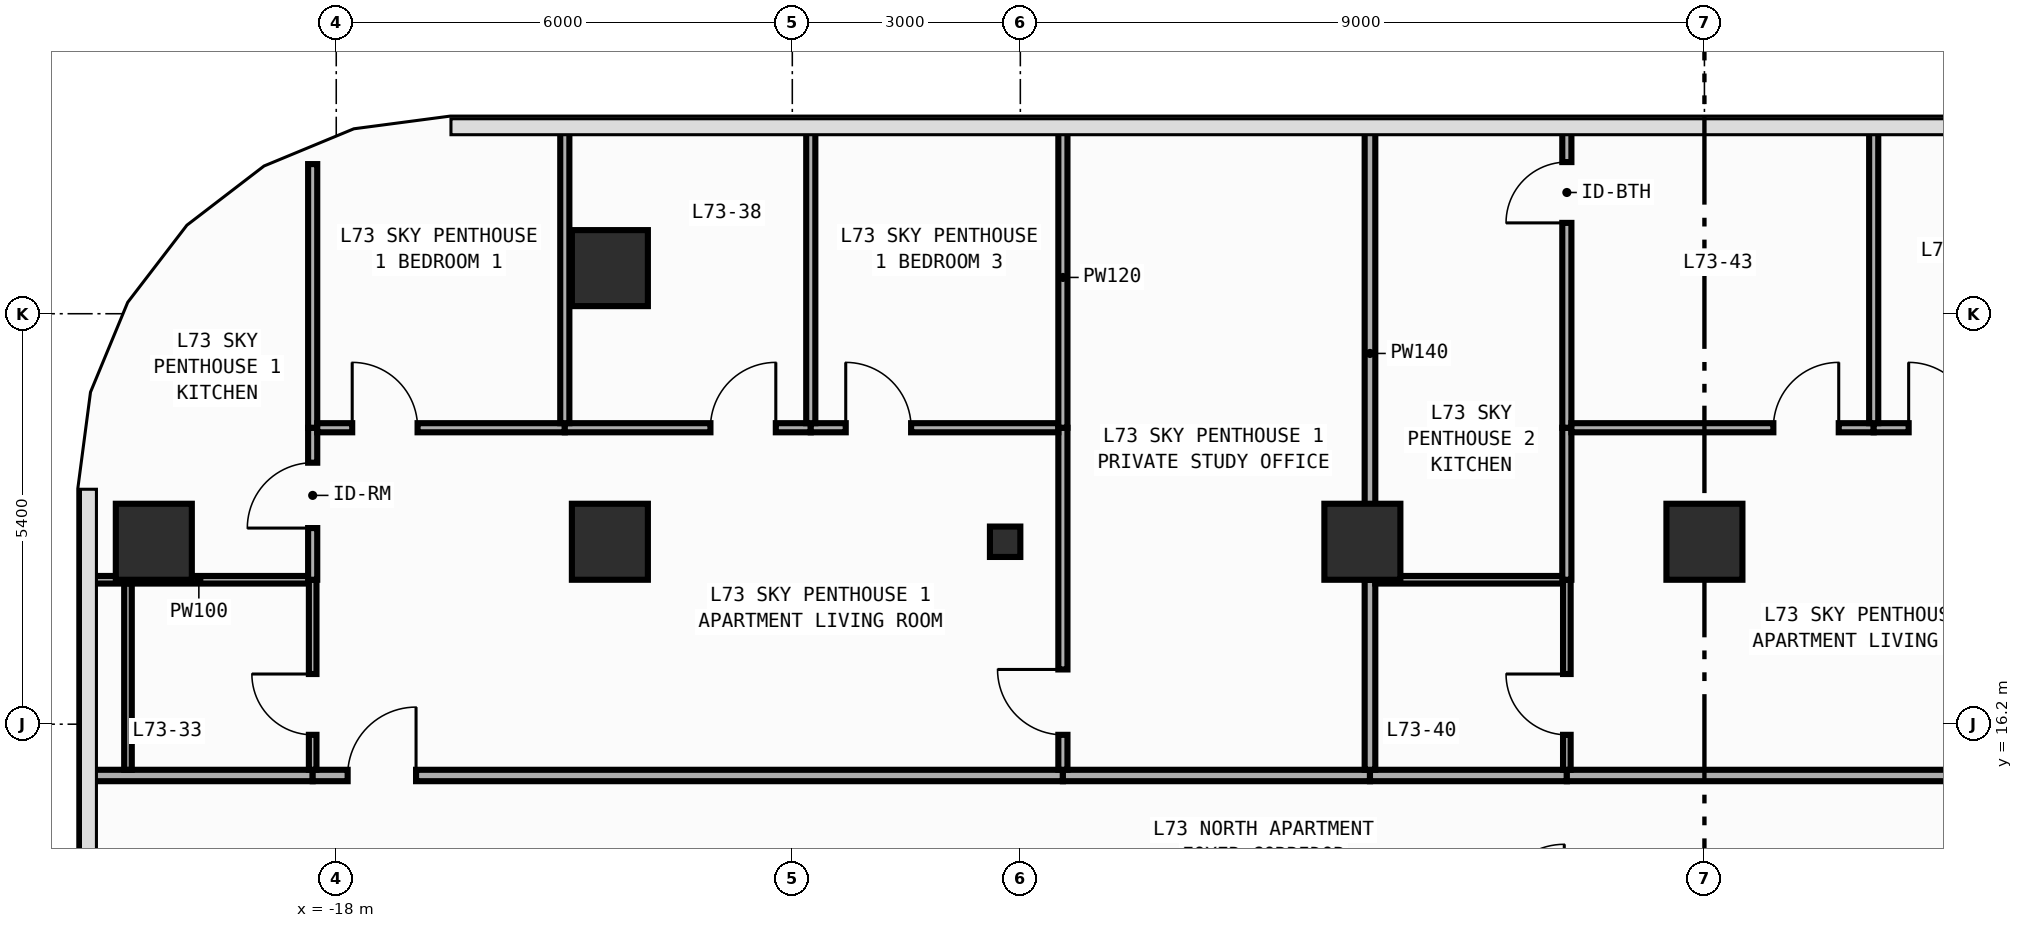
"""IFC4 building model, lengths in metres.
Left out: names, types, materials, properties, quantities, classifications, styles, units other than length and angle.
Written with IfcOpenShell. Run it as: python <this file> out.ifc"""

import sys

from ifc_helpers import new_model, si_unit, direction, frame, frame_2d, origin, origin_2d, place, context, subcontext, project, spatial, rectangle, circle, i_section, extrude, element, fill, save


model = new_model("IFC4")
c1 = context("Model", 3, precision=1e-05, world=origin(), true_north=direction((0.0, 1.0)))
c2 = subcontext(c1, "Body", "Model", "MODEL_VIEW")
j1 = project(units=[si_unit("LENGTHUNIT", "METRE"), si_unit("PLANEANGLEUNIT", "RADIAN")], contexts=[c1])
p1 = place(None, origin())
s1 = spatial("IfcSite", under=j1, at=p1, CompositionType="ELEMENT")
p2 = place(p1, origin())
s2 = spatial("IfcBuilding", under=s1, at=p2, CompositionType="ELEMENT")
p3 = place(p2, frame((0.0, 0.0, 304.2)))
s3 = spatial("IfcBuildingStorey", under=s2, at=p3, CompositionType="ELEMENT", Elevation=304.2)
p4 = place(p3, frame((-9.2, 18.6, 0.0), z_axis=(0.0, 0.0, 1.0), x_axis=(1.0, 0.0, 0.0)))
e1 = element("IfcColumn", 1, at=p4, inside=s3, PredefinedType="COLUMN", context=c2, shape_type="SweptSolid", body=[
    extrude(i_section(OverallWidth=0.4, OverallDepth=0.4, WebThickness=0.013, FlangeThickness=0.021, FilletRadius=0.022, at=origin_2d()), origin(), (0.0, 0.0, 1.0), 3.8),
])
for number, where, z_axis, x_axis in (
    (2, (-20.4, 18.6, 0.0), (0.0, 0.0, 1.0), (1.0, 0.0, 0.0)),
    (3, (-14.4, 18.6, 0.0), (0.0, 0.0, 1.0), (1.0, 0.0, 0.0)),
    (4, (-4.5, 18.6, 0.0), (0.0, 0.0, 1.0), (1.0, 0.0, 0.0)),
    (5, (0.0, 18.6, 0.0), (0.0, 0.0, 1.0), (1.0, 0.0, 0.0)),
    (6, (-14.4, 22.2, 0.0), (0.0, 0.0, 1.0), (1.0, 0.0, 0.0)),
):
    element("IfcColumn", number, at=place(p3, frame(where, z_axis=z_axis, x_axis=x_axis)), inside=s3, PredefinedType="COLUMN", context=c2, shape_type="SweptSolid", body=[
        extrude(circle(Radius=0.5, at=origin_2d()), origin(), (0.0, 0.0, 1.0), 3.8),
    ])
p5 = place(p3, frame((-21.255, 15.525, 0.0), z_axis=(0.0, 0.0, 1.0), x_axis=(1.0, 0.0, 0.0)))
e7 = element("IfcWall", 7, at=p5, inside=s3, PredefinedType="PARTITIONING", context=c2, shape_type="SweptSolid", body=[
    extrude(rectangle(XDim=2.945, YDim=0.15, at=frame_2d((1.472, 0.0))), origin(), (0.0, 0.0, 1.0), 3.54),
])
p6 = place(p3, frame((-18.31, 15.525, 0.0), z_axis=(0.0, 0.0, 1.0), x_axis=(1.0, 0.0, 0.0)))
e8 = element("IfcWall", 8, at=p6, inside=s3, PredefinedType="PARTITIONING", context=c2, shape_type="SweptSolid", body=[
    extrude(rectangle(XDim=9.87, YDim=0.15, at=frame_2d((4.935, 0.0))), origin(), (0.0, 0.0, 1.0), 3.54),
])
p7 = place(p6, frame((0.46, 0.0, 0.0)))
e9 = element("IfcOpeningElement", 9, at=p7, cuts=e8, PredefinedType="OPENING", context=c2, shape_type="SweptSolid", body=[
    extrude(rectangle(XDim=0.9, YDim=2.15, at=frame_2d((0.45, 1.075))), frame((0.0, 0.085, 0.0), z_axis=(0.0, -1.0, 0.0), x_axis=(1.0, 0.0, 0.0)), (0.0, 0.0, 1.0), 0.17),
])
p8 = place(p3, frame((-8.44, 15.525, 0.0), z_axis=(0.0, 0.0, 1.0), x_axis=(1.0, 0.0, 0.0)))
e10 = element("IfcWall", 10, at=p8, inside=s3, PredefinedType="PARTITIONING", context=c2, shape_type="SweptSolid", body=[
    extrude(rectangle(XDim=4.04, YDim=0.15, at=frame_2d((2.02, 0.0))), origin(), (0.0, 0.0, 1.0), 3.54),
])
p9 = place(p3, frame((-4.4, 15.525, 0.0), z_axis=(0.0, 0.0, 1.0), x_axis=(1.0, 0.0, 0.0)))
e11 = element("IfcWall", 11, at=p9, inside=s3, PredefinedType="PARTITIONING", context=c2, shape_type="SweptSolid", body=[
    extrude(rectangle(XDim=2.59, YDim=0.15, at=frame_2d((1.295, 0.0))), origin(), (0.0, 0.0, 1.0), 3.54),
])
p10 = place(p3, frame((-1.81, 15.525, 0.0), z_axis=(0.0, 0.0, 1.0), x_axis=(1.0, 0.0, 0.0)))
e12 = element("IfcWall", 12, at=p10, inside=s3, PredefinedType="PARTITIONING", context=c2, shape_type="SweptSolid", body=[
    extrude(rectangle(XDim=11.25, YDim=0.15, at=frame_2d((5.625, 0.0))), origin(), (0.0, 0.0, 1.0), 3.54),
])
p11 = place(p10, frame((8.486, 0.0, 0.0)))
e13 = element("IfcOpeningElement", 13, at=p11, cuts=e12, PredefinedType="OPENING", context=c2, shape_type="SweptSolid", body=[
    extrude(rectangle(XDim=0.9, YDim=2.15, at=frame_2d((0.45, 1.075))), frame((0.0, 0.085, 0.0), z_axis=(0.0, -1.0, 0.0), x_axis=(1.0, 0.0, 0.0)), (0.0, 0.0, 1.0), 0.17),
])
p12 = place(p3, frame((-21.255, 18.1, 0.0), z_axis=(0.0, 0.0, 1.0), x_axis=(1.0, 0.0, 0.0)))
e14 = element("IfcWall", 14, at=p12, inside=s3, PredefinedType="PARTITIONING", context=c2, shape_type="SweptSolid", body=[
    extrude(rectangle(XDim=2.895, YDim=0.1, at=frame_2d((1.447, 0.0))), origin(), (0.0, 0.0, 1.0), 3.54),
])
p13 = place(p3, frame((-18.31, 15.6, 0.0), z_axis=(0.0, 0.0, 1.0), x_axis=(0.0, 1.0, 0.0)))
e15 = element("IfcWall", 15, at=p13, inside=s3, PredefinedType="PARTITIONING", context=c2, shape_type="SweptSolid", body=[
    extrude(rectangle(XDim=2.5, YDim=0.1, at=frame_2d((1.25, 0.0))), origin(), (0.0, 0.0, 1.0), 3.54),
])
p14 = place(p13, frame((0.46, 0.0, 0.0)))
e16 = element("IfcOpeningElement", 16, at=p14, cuts=e15, PredefinedType="OPENING", context=c2, shape_type="SweptSolid", body=[
    extrude(rectangle(XDim=0.8, YDim=2.1, at=frame_2d((0.4, 1.05))), frame((0.0, 0.06, 0.0), z_axis=(0.0, -1.0, 0.0), x_axis=(1.0, 0.0, 0.0)), (0.0, 0.0, 1.0), 0.12),
])
p15 = place(p3, frame((-18.31, 18.1, 0.0), z_axis=(0.0, 0.0, 1.0), x_axis=(0.0, 1.0, 0.0)))
e17 = element("IfcWall", 17, at=p15, inside=s3, PredefinedType="PARTITIONING", context=c2, shape_type="SweptSolid", body=[
    extrude(rectangle(XDim=2.0, YDim=0.12, at=frame_2d((1.0, 0.0))), origin(), (0.0, 0.0, 1.0), 3.54),
])
p16 = place(p15, frame((0.68, 0.0, 0.0)))
e18 = element("IfcOpeningElement", 18, at=p16, cuts=e17, PredefinedType="OPENING", context=c2, shape_type="SweptSolid", body=[
    extrude(rectangle(XDim=0.86, YDim=2.15, at=frame_2d((0.43, 1.075))), frame((0.0, 0.07, 0.0), z_axis=(0.0, -1.0, 0.0), x_axis=(1.0, 0.0, 0.0)), (0.0, 0.0, 1.0), 0.14),
])
p17 = place(p3, frame((-18.31, 20.1, 0.0), z_axis=(0.0, 0.0, 1.0), x_axis=(0.0, 1.0, 0.0)))
e19 = element("IfcWall", 19, at=p17, inside=s3, PredefinedType="PARTITIONING", context=c2, shape_type="SweptSolid", body=[
    extrude(rectangle(XDim=3.469, YDim=0.12, at=frame_2d((1.734, 0.0))), origin(), (0.0, 0.0, 1.0), 3.54),
])
p18 = place(p3, frame((-8.44, 15.6, 0.0), z_axis=(0.0, 0.0, 1.0), x_axis=(0.0, 1.0, 0.0)))
e20 = element("IfcWall", 20, at=p18, inside=s3, PredefinedType="PARTITIONING", context=c2, shape_type="SweptSolid", body=[
    extrude(rectangle(XDim=4.5, YDim=0.12, at=frame_2d((2.25, 0.0))), origin(), (0.0, 0.0, 1.0), 3.54),
])
p19 = place(p18, frame((0.46, 0.0, 0.0)))
e21 = element("IfcOpeningElement", 21, at=p19, cuts=e20, PredefinedType="OPENING", context=c2, shape_type="SweptSolid", body=[
    extrude(rectangle(XDim=0.86, YDim=2.15, at=frame_2d((0.43, 1.075))), frame((0.0, 0.07, 0.0), z_axis=(0.0, -1.0, 0.0), x_axis=(1.0, 0.0, 0.0)), (0.0, 0.0, 1.0), 0.14),
])
p20 = place(p3, frame((-18.25, 20.1, 0.0), z_axis=(0.0, 0.0, 1.0), x_axis=(1.0, 0.0, 0.0)))
e22 = element("IfcWall", 22, at=p20, inside=s3, PredefinedType="PARTITIONING", context=c2, shape_type="SweptSolid", body=[
    extrude(rectangle(XDim=3.257, YDim=0.12, at=frame_2d((1.628, 0.0))), origin(), (0.0, 0.0, 1.0), 3.54),
])
p21 = place(p20, frame((0.46, 0.0, 0.0)))
e23 = element("IfcOpeningElement", 23, at=p21, cuts=e22, PredefinedType="OPENING", context=c2, shape_type="SweptSolid", body=[
    extrude(rectangle(XDim=0.86, YDim=2.15, at=frame_2d((0.43, 1.075))), frame((0.0, 0.07, 0.0), z_axis=(0.0, -1.0, 0.0), x_axis=(1.0, 0.0, 0.0)), (0.0, 0.0, 1.0), 0.14),
])
p22 = place(p3, frame((-14.993, 20.1, 0.0), z_axis=(0.0, 0.0, 1.0), x_axis=(1.0, 0.0, 0.0)))
e24 = element("IfcWall", 24, at=p22, inside=s3, PredefinedType="PARTITIONING", context=c2, shape_type="SweptSolid", body=[
    extrude(rectangle(XDim=3.236, YDim=0.12, at=frame_2d((1.618, 0.0))), origin(), (0.0, 0.0, 1.0), 3.54),
])
p23 = place(p22, frame((1.916, 0.0, 0.0)))
e25 = element("IfcOpeningElement", 25, at=p23, cuts=e24, PredefinedType="OPENING", context=c2, shape_type="SweptSolid", body=[
    extrude(rectangle(XDim=0.86, YDim=2.15, at=frame_2d((0.43, 1.075))), frame((0.0, 0.07, 0.0), z_axis=(0.0, -1.0, 0.0), x_axis=(1.0, 0.0, 0.0)), (0.0, 0.0, 1.0), 0.14),
])
p24 = place(p3, frame((-11.757, 20.1, 0.0), z_axis=(0.0, 0.0, 1.0), x_axis=(1.0, 0.0, 0.0)))
e26 = element("IfcWall", 26, at=p24, inside=s3, PredefinedType="PARTITIONING", context=c2, shape_type="SweptSolid", body=[
    extrude(rectangle(XDim=3.257, YDim=0.12, at=frame_2d((1.628, 0.0))), origin(), (0.0, 0.0, 1.0), 3.54),
])
p25 = place(p24, frame((0.46, 0.0, 0.0)))
e27 = element("IfcOpeningElement", 27, at=p25, cuts=e26, PredefinedType="OPENING", context=c2, shape_type="SweptSolid", body=[
    extrude(rectangle(XDim=0.86, YDim=2.15, at=frame_2d((0.43, 1.075))), frame((0.0, 0.07, 0.0), z_axis=(0.0, -1.0, 0.0), x_axis=(1.0, 0.0, 0.0)), (0.0, 0.0, 1.0), 0.14),
])
p26 = place(p3, frame((-8.44, 20.1, 0.0), z_axis=(0.0, 0.0, 1.0), x_axis=(0.0, 1.0, 0.0)))
e28 = element("IfcWall", 28, at=p26, inside=s3, PredefinedType="PARTITIONING", context=c2, shape_type="SweptSolid", body=[
    extrude(rectangle(XDim=3.955, YDim=0.12, at=frame_2d((1.978, 0.0))), origin(), (0.0, 0.0, 1.0), 3.54),
])
p27 = place(p3, frame((-4.4, 15.6, 0.0), z_axis=(0.0, 0.0, 1.0), x_axis=(0.0, 1.0, 0.0)))
e29 = element("IfcWall", 29, at=p27, inside=s3, PredefinedType="PARTITIONING", context=c2, shape_type="SweptSolid", body=[
    extrude(rectangle(XDim=2.5, YDim=0.14, at=frame_2d((1.25, 0.0))), origin(), (0.0, 0.0, 1.0), 3.54),
])
p28 = place(p3, frame((-4.4, 18.1, 0.0), z_axis=(0.0, 0.0, 1.0), x_axis=(0.0, 1.0, 0.0)))
e30 = element("IfcWall", 30, at=p28, inside=s3, PredefinedType="PARTITIONING", context=c2, shape_type="SweptSolid", body=[
    extrude(rectangle(XDim=5.955, YDim=0.14, at=frame_2d((2.978, 0.0))), origin(), (0.0, 0.0, 1.0), 3.54),
])
for number, where, z_axis, x_axis in (
    (31, (-14.993, 20.16, 0.0), (0.0, 0.0, 1.0), (0.0, 1.0, 0.0)),
    (32, (-11.757, 20.16, 0.0), (0.0, 0.0, 1.0), (0.0, 1.0, 0.0)),
):
    element("IfcWall", number, at=place(p3, frame(where, z_axis=z_axis, x_axis=x_axis)), inside=s3, PredefinedType="PARTITIONING", context=c2, shape_type="SweptSolid", body=[
        extrude(rectangle(XDim=3.895, YDim=0.12, at=frame_2d((1.948, 0.0))), origin(), (0.0, 0.0, 1.0), 3.54),
    ])
p29 = place(p3, frame((-4.33, 18.1, 0.0), z_axis=(0.0, 0.0, 1.0), x_axis=(1.0, 0.0, 0.0)))
e33 = element("IfcWall", 33, at=p29, inside=s3, PredefinedType="PARTITIONING", context=c2, shape_type="SweptSolid", body=[
    extrude(rectangle(XDim=2.47, YDim=0.1, at=frame_2d((1.235, 0.0))), origin(), (0.0, 0.0, 1.0), 3.54),
])
p30 = place(p3, frame((-1.81, 15.6, 0.0), z_axis=(0.0, 0.0, 1.0), x_axis=(0.0, 1.0, 0.0)))
e34 = element("IfcWall", 34, at=p30, inside=s3, PredefinedType="PARTITIONING", context=c2, shape_type="SweptSolid", body=[
    extrude(rectangle(XDim=2.5, YDim=0.1, at=frame_2d((1.25, 0.0))), origin(), (0.0, 0.0, 1.0), 3.54),
])
p31 = place(p30, frame((0.46, 0.0, 0.0)))
e35 = element("IfcOpeningElement", 35, at=p31, cuts=e34, PredefinedType="OPENING", context=c2, shape_type="SweptSolid", body=[
    extrude(rectangle(XDim=0.8, YDim=2.1, at=frame_2d((0.4, 1.05))), frame((0.0, 0.06, 0.0), z_axis=(0.0, -1.0, 0.0), x_axis=(1.0, 0.0, 0.0)), (0.0, 0.0, 1.0), 0.12),
])
p32 = place(p3, frame((-1.81, 18.1, 0.0), z_axis=(0.0, 0.0, 1.0), x_axis=(0.0, 1.0, 0.0)))
e36 = element("IfcWall", 36, at=p32, inside=s3, PredefinedType="PARTITIONING", context=c2, shape_type="SweptSolid", body=[
    extrude(rectangle(XDim=2.0, YDim=0.12, at=frame_2d((1.0, 0.0))), origin(), (0.0, 0.0, 1.0), 3.54),
])
p33 = place(p3, frame((-1.81, 20.1, 0.0), z_axis=(0.0, 0.0, 1.0), x_axis=(0.0, 1.0, 0.0)))
e37 = element("IfcWall", 37, at=p33, inside=s3, PredefinedType="PARTITIONING", context=c2, shape_type="SweptSolid", body=[
    extrude(rectangle(XDim=3.955, YDim=0.12, at=frame_2d((1.978, 0.0))), origin(), (0.0, 0.0, 1.0), 3.54),
])
p34 = place(p33, frame((2.695, 0.0, 0.0)))
e38 = element("IfcOpeningElement", 38, at=p34, cuts=e37, PredefinedType="OPENING", context=c2, shape_type="SweptSolid", body=[
    extrude(rectangle(XDim=0.8, YDim=2.1, at=frame_2d((0.4, 1.05))), frame((0.0, 0.07, 0.0), z_axis=(0.0, -1.0, 0.0), x_axis=(1.0, 0.0, 0.0)), (0.0, 0.0, 1.0), 0.14),
])
p35 = place(p3, frame((-1.75, 20.1, 0.0), z_axis=(0.0, 0.0, 1.0), x_axis=(1.0, 0.0, 0.0)))
e39 = element("IfcWall", 39, at=p35, inside=s3, PredefinedType="PARTITIONING", context=c2, shape_type="SweptSolid", body=[
    extrude(rectangle(XDim=3.977, YDim=0.12, at=frame_2d((1.989, 0.0))), origin(), (0.0, 0.0, 1.0), 3.54),
])
p36 = place(p35, frame((2.657, 0.0, 0.0)))
e40 = element("IfcOpeningElement", 40, at=p36, cuts=e39, PredefinedType="OPENING", context=c2, shape_type="SweptSolid", body=[
    extrude(rectangle(XDim=0.86, YDim=2.15, at=frame_2d((0.43, 1.075))), frame((0.0, 0.07, 0.0), z_axis=(0.0, -1.0, 0.0), x_axis=(1.0, 0.0, 0.0)), (0.0, 0.0, 1.0), 0.14),
])
p37 = place(p3, frame((2.227, 20.1, 0.0), z_axis=(0.0, 0.0, 1.0), x_axis=(1.0, 0.0, 0.0)))
e41 = element("IfcWall", 41, at=p37, inside=s3, PredefinedType="PARTITIONING", context=c2, shape_type="SweptSolid", body=[
    extrude(rectangle(XDim=3.956, YDim=0.12, at=frame_2d((1.978, 0.0))), origin(), (0.0, 0.0, 1.0), 3.54),
])
p38 = place(p37, frame((0.46, 0.0, 0.0)))
e42 = element("IfcOpeningElement", 42, at=p38, cuts=e41, PredefinedType="OPENING", context=c2, shape_type="SweptSolid", body=[
    extrude(rectangle(XDim=0.86, YDim=2.15, at=frame_2d((0.43, 1.075))), frame((0.0, 0.07, 0.0), z_axis=(0.0, -1.0, 0.0), x_axis=(1.0, 0.0, 0.0)), (0.0, 0.0, 1.0), 0.14),
])
p39 = place(p3, frame((2.227, 20.16, 0.0), z_axis=(0.0, 0.0, 1.0), x_axis=(0.0, 1.0, 0.0)))
e43 = element("IfcWall", 43, at=p39, inside=s3, PredefinedType="PARTITIONING", context=c2, shape_type="SweptSolid", body=[
    extrude(rectangle(XDim=3.895, YDim=0.12, at=frame_2d((1.948, 0.0))), origin(), (0.0, 0.0, 1.0), 3.54),
])
p40 = place(p3, frame((-20.74, 15.6, 0.0), z_axis=(0.0, 0.0, 1.0), x_axis=(0.0, 1.0, 0.0)))
e44 = element("IfcWall", 44, at=p40, inside=s3, PredefinedType="PARTITIONING", context=c2, shape_type="SweptSolid", body=[
    extrude(rectangle(XDim=2.45, YDim=0.1, at=frame_2d((1.225, 0.0))), origin(), (0.0, 0.0, 1.0), 3.54),
])
p41 = place(p7, origin())
e45 = element("IfcDoor", 45, at=p41, inside=s3, OperationType="SINGLE_SWING_RIGHT", PredefinedType="DOOR", context=c2, shape_type="SweptSolid", body=[
    extrude(rectangle(XDim=0.9, YDim=2.15, at=frame_2d((0.45, 1.075))), frame((0.0, 0.025, 0.0), z_axis=(0.0, -1.0, 0.0), x_axis=(1.0, 0.0, 0.0)), (0.0, 0.0, 1.0), 0.05),
])
fill(e9, e45)
p42 = place(p14, origin())
e46 = element("IfcDoor", 46, at=p42, inside=s3, OperationType="SINGLE_SWING_RIGHT", PredefinedType="DOOR", context=c2, shape_type="SweptSolid", body=[
    extrude(rectangle(XDim=0.8, YDim=2.1, at=frame_2d((0.4, 1.05))), frame((0.0, 0.025, 0.0), z_axis=(0.0, -1.0, 0.0), x_axis=(1.0, 0.0, 0.0)), (0.0, 0.0, 1.0), 0.05),
])
fill(e16, e46)
p43 = place(p16, origin())
e47 = element("IfcDoor", 47, at=p43, inside=s3, OperationType="SINGLE_SWING_LEFT", PredefinedType="DOOR", context=c2, shape_type="SweptSolid", body=[
    extrude(rectangle(XDim=0.86, YDim=2.15, at=frame_2d((0.43, 1.075))), frame((0.0, 0.025, 0.0), z_axis=(0.0, -1.0, 0.0), x_axis=(1.0, 0.0, 0.0)), (0.0, 0.0, 1.0), 0.05),
])
fill(e18, e47)
p44 = place(p19, origin())
e48 = element("IfcDoor", 48, at=p44, inside=s3, OperationType="SINGLE_SWING_RIGHT", PredefinedType="DOOR", context=c2, shape_type="SweptSolid", body=[
    extrude(rectangle(XDim=0.86, YDim=2.15, at=frame_2d((0.43, 1.075))), frame((0.0, 0.025, 0.0), z_axis=(0.0, -1.0, 0.0), x_axis=(1.0, 0.0, 0.0)), (0.0, 0.0, 1.0), 0.05),
])
fill(e21, e48)
p45 = place(p21, origin())
e49 = element("IfcDoor", 49, at=p45, inside=s3, OperationType="SINGLE_SWING_LEFT", PredefinedType="DOOR", context=c2, shape_type="SweptSolid", body=[
    extrude(rectangle(XDim=0.86, YDim=2.15, at=frame_2d((0.43, 1.075))), frame((0.0, 0.025, 0.0), z_axis=(0.0, -1.0, 0.0), x_axis=(1.0, 0.0, 0.0)), (0.0, 0.0, 1.0), 0.05),
])
fill(e23, e49)
p46 = place(p23, origin())
e50 = element("IfcDoor", 50, at=p46, inside=s3, OperationType="SINGLE_SWING_RIGHT", PredefinedType="DOOR", context=c2, shape_type="SweptSolid", body=[
    extrude(rectangle(XDim=0.86, YDim=2.15, at=frame_2d((0.43, 1.075))), frame((0.0, 0.025, 0.0), z_axis=(0.0, -1.0, 0.0), x_axis=(1.0, 0.0, 0.0)), (0.0, 0.0, 1.0), 0.05),
])
fill(e25, e50)
p47 = place(p25, origin())
e51 = element("IfcDoor", 51, at=p47, inside=s3, OperationType="SINGLE_SWING_LEFT", PredefinedType="DOOR", context=c2, shape_type="SweptSolid", body=[
    extrude(rectangle(XDim=0.86, YDim=2.15, at=frame_2d((0.43, 1.075))), frame((0.0, 0.025, 0.0), z_axis=(0.0, -1.0, 0.0), x_axis=(1.0, 0.0, 0.0)), (0.0, 0.0, 1.0), 0.05),
])
fill(e27, e51)
p48 = place(p31, origin())
e52 = element("IfcDoor", 52, at=p48, inside=s3, OperationType="SINGLE_SWING_RIGHT", PredefinedType="DOOR", context=c2, shape_type="SweptSolid", body=[
    extrude(rectangle(XDim=0.8, YDim=2.1, at=frame_2d((0.4, 1.05))), frame((0.0, 0.025, 0.0), z_axis=(0.0, -1.0, 0.0), x_axis=(1.0, 0.0, 0.0)), (0.0, 0.0, 1.0), 0.05),
])
fill(e35, e52)
p49 = place(p36, origin())
e53 = element("IfcDoor", 53, at=p49, inside=s3, OperationType="SINGLE_SWING_RIGHT", PredefinedType="DOOR", context=c2, shape_type="SweptSolid", body=[
    extrude(rectangle(XDim=0.86, YDim=2.15, at=frame_2d((0.43, 1.075))), frame((0.0, 0.025, 0.0), z_axis=(0.0, -1.0, 0.0), x_axis=(1.0, 0.0, 0.0)), (0.0, 0.0, 1.0), 0.05),
])
fill(e40, e53)
p50 = place(p38, origin())
e54 = element("IfcDoor", 54, at=p50, inside=s3, OperationType="SINGLE_SWING_LEFT", PredefinedType="DOOR", context=c2, shape_type="SweptSolid", body=[
    extrude(rectangle(XDim=0.86, YDim=2.15, at=frame_2d((0.43, 1.075))), frame((0.0, 0.025, 0.0), z_axis=(0.0, -1.0, 0.0), x_axis=(1.0, 0.0, 0.0)), (0.0, 0.0, 1.0), 0.05),
])
fill(e42, e54)
p51 = place(p34, origin())
e55 = element("IfcDoor", 55, at=p51, inside=s3, OperationType="SINGLE_SWING_LEFT", PredefinedType="DOOR", context=c2, shape_type="SweptSolid", body=[
    extrude(rectangle(XDim=0.8, YDim=2.1, at=frame_2d((0.4, 1.05))), frame((0.0, 0.025, 0.0), z_axis=(0.0, -1.0, 0.0), x_axis=(1.0, 0.0, 0.0)), (0.0, 0.0, 1.0), 0.05),
])
fill(e38, e55)
save(model, sys.argv[1])
